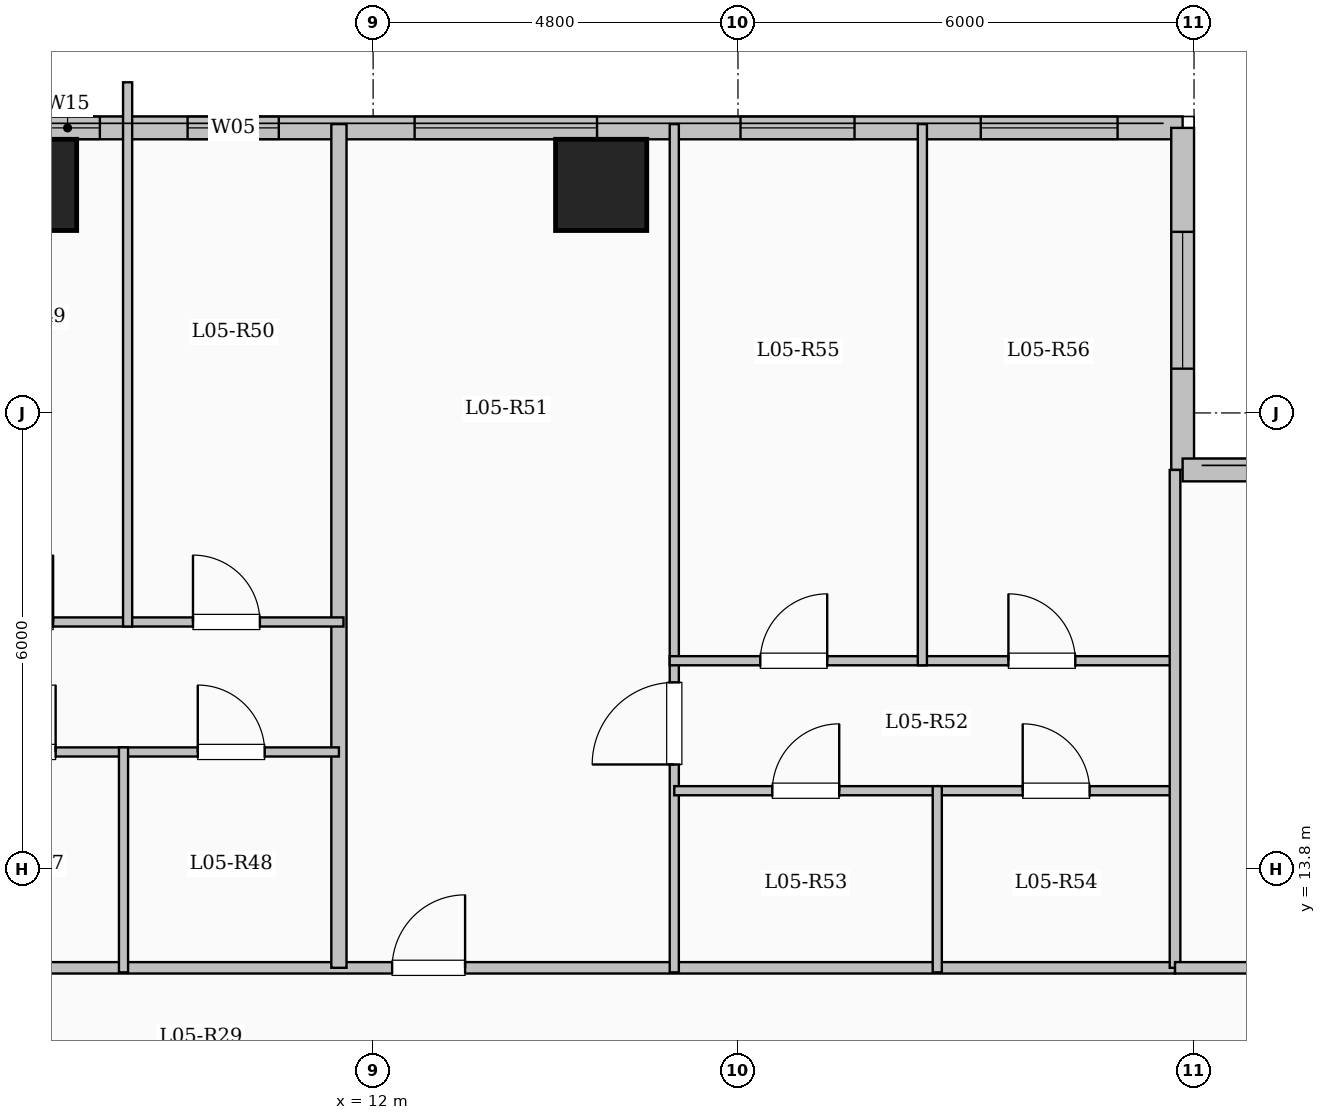
"""IFC4 building model, lengths in metres.
Left out: names, types, materials, properties, quantities, classifications, styles, units other than length and angle.
Written with IfcOpenShell. Run it as: python <this file> out.ifc"""

import sys

from ifc_helpers import new_model, si_unit, direction, frame, frame_2d, origin, origin_2d, place, context, subcontext, project, spatial, rectangle, extrude, element, fill, save


model = new_model("IFC4")
c1 = context("Model", 3, precision=1e-05, world=origin(), true_north=direction((0.0, 1.0)))
c2 = subcontext(c1, "Body", "Model", "MODEL_VIEW")
j1 = project(units=[si_unit("LENGTHUNIT", "METRE"), si_unit("PLANEANGLEUNIT", "RADIAN")], contexts=[c1])
p1 = place(None, origin())
s1 = spatial("IfcSite", under=j1, at=p1, CompositionType="ELEMENT")
p2 = place(p1, origin())
s2 = spatial("IfcBuilding", under=s1, at=p2, CompositionType="ELEMENT")
p3 = place(p2, frame((0.0, 0.0, 24.0)))
s3 = spatial("IfcBuildingStorey", under=s2, at=p3, CompositionType="ELEMENT", Elevation=24.0)
for number, where, z_axis, x_axis in (
    (1, (7.5, 22.8, 0.0), (0.0, 0.0, 1.0), (1.0, 0.0, 0.0)),
    (2, (15.0, 22.8, 0.0), (0.0, 0.0, 1.0), (1.0, 0.0, 0.0)),
):
    element("IfcColumn", number, at=place(p3, frame(where, z_axis=z_axis, x_axis=x_axis)), inside=s3, PredefinedType="COLUMN", context=c2, shape_type="SweptSolid", body=[
        extrude(rectangle(XDim=1.2, YDim=1.2, at=origin_2d()), origin(), (0.0, 0.0, 1.0), 3.35),
    ])
p4 = place(p3, frame((7.35, 23.55, 0.0), z_axis=(0.0, 0.0, 1.0), x_axis=(1.0, 0.0, 0.0)))
e3 = element("IfcWall", 3, at=p4, inside=s3, PredefinedType="SOLIDWALL", context=c2, shape_type="SweptSolid", body=[
    extrude(rectangle(XDim=15.3, YDim=0.3, at=frame_2d((7.65, 0.0))), origin(), (0.0, 0.0, 1.0), 3.1),
])
p5 = place(p4, frame((0.205, 0.0, 0.95)))
e4 = element("IfcOpeningElement", 4, at=p5, cuts=e3, PredefinedType="OPENING", context=c2, shape_type="SweptSolid", body=[
    extrude(rectangle(XDim=0.85, YDim=1.5, at=frame_2d((0.425, 0.75))), frame((0.0, 0.16, 0.0), z_axis=(0.0, -1.0, 0.0), x_axis=(1.0, 0.0, 0.0)), (0.0, 0.0, 1.0), 0.32),
])
p6 = place(p4, frame((2.209, 0.0, 0.95)))
e5 = element("IfcOpeningElement", 5, at=p6, cuts=e3, PredefinedType="OPENING", context=c2, shape_type="SweptSolid", body=[
    extrude(rectangle(XDim=1.2, YDim=1.5, at=frame_2d((0.6, 0.75))), frame((0.0, 0.16, 0.0), z_axis=(0.0, -1.0, 0.0), x_axis=(1.0, 0.0, 0.0)), (0.0, 0.0, 1.0), 0.32),
])
p7 = place(p4, frame((5.196, 0.0, 0.9)))
e6 = element("IfcOpeningElement", 6, at=p7, cuts=e3, PredefinedType="OPENING", context=c2, shape_type="SweptSolid", body=[
    extrude(rectangle(XDim=2.4, YDim=1.8, at=frame_2d((1.2, 0.9))), frame((0.0, 0.16, 0.0), z_axis=(0.0, -1.0, 0.0), x_axis=(1.0, 0.0, 0.0)), (0.0, 0.0, 1.0), 0.32),
])
p8 = place(p4, frame((9.483, 0.0, 0.9)))
e7 = element("IfcOpeningElement", 7, at=p8, cuts=e3, PredefinedType="OPENING", context=c2, shape_type="SweptSolid", body=[
    extrude(rectangle(XDim=1.5, YDim=1.65, at=frame_2d((0.75, 0.825))), frame((0.0, 0.16, 0.0), z_axis=(0.0, -1.0, 0.0), x_axis=(1.0, 0.0, 0.0)), (0.0, 0.0, 1.0), 0.32),
])
p9 = place(p4, frame((12.644, 0.0, 0.9)))
e8 = element("IfcOpeningElement", 8, at=p9, cuts=e3, PredefinedType="OPENING", context=c2, shape_type="SweptSolid", body=[
    extrude(rectangle(XDim=1.8, YDim=1.65, at=frame_2d((0.9, 0.825))), frame((0.0, 0.16, 0.0), z_axis=(0.0, -1.0, 0.0), x_axis=(1.0, 0.0, 0.0)), (0.0, 0.0, 1.0), 0.32),
])
p10 = place(p3, frame((22.65, 23.55, 0.0), z_axis=(0.0, 0.0, 1.0), x_axis=(0.0, -1.0, 0.0)))
e9 = element("IfcWall", 9, at=p10, inside=s3, PredefinedType="SOLIDWALL", context=c2, shape_type="SweptSolid", body=[
    extrude(rectangle(XDim=4.5, YDim=0.3, at=frame_2d((2.25, 0.0))), origin(), (0.0, 0.0, 1.0), 3.1),
])
p11 = place(p10, frame((1.367, 0.0, 0.9)))
e10 = element("IfcOpeningElement", 10, at=p11, cuts=e9, PredefinedType="OPENING", context=c2, shape_type="SweptSolid", body=[
    extrude(rectangle(XDim=1.8, YDim=1.65, at=frame_2d((0.9, 0.825))), frame((0.0, 0.16, 0.0), z_axis=(0.0, -1.0, 0.0), x_axis=(1.0, 0.0, 0.0)), (0.0, 0.0, 1.0), 0.32),
])
p12 = place(p3, frame((22.65, 19.05, 0.0), z_axis=(0.0, 0.0, 1.0), x_axis=(1.0, 0.0, 0.0)))
e11 = element("IfcWall", 11, at=p12, inside=s3, PredefinedType="SOLIDWALL", context=c2, shape_type="SweptSolid", body=[
    extrude(rectangle(XDim=6.0, YDim=0.3, at=frame_2d((3.0, 0.0))), origin(), (0.0, 0.0, 1.0), 3.1),
])
p13 = place(p12, frame((1.975, 0.0, 0.9)))
e12 = element("IfcOpeningElement", 12, at=p13, cuts=e11, PredefinedType="OPENING", context=c2, shape_type="SweptSolid", body=[
    extrude(rectangle(XDim=2.0, YDim=1.7, at=frame_2d((1.0, 0.85))), frame((0.0, 0.16, 0.0), z_axis=(0.0, -1.0, 0.0), x_axis=(1.0, 0.0, 0.0)), (0.0, 0.0, 1.0), 0.32),
])
p14 = place(p3, frame((3.85, 12.5, 0.0), z_axis=(0.0, 0.0, 1.0), x_axis=(1.0, 0.0, 0.0)))
e13 = element("IfcWall", 13, at=p14, inside=s3, PredefinedType="PARTITIONING", context=c2, shape_type="SweptSolid", body=[
    extrude(rectangle(XDim=18.7, YDim=0.15, at=frame_2d((9.35, 0.0))), origin(), (0.0, 0.0, 1.0), 3.1),
])
p15 = place(p14, frame((0.7, 0.0, 0.0)))
e14 = element("IfcOpeningElement", 14, at=p15, cuts=e13, PredefinedType="OPENING", context=c2, shape_type="SweptSolid", body=[
    extrude(rectangle(XDim=0.96, YDim=2.15, at=frame_2d((0.48, 1.075))), frame((0.0, 0.085, 0.0), z_axis=(0.0, -1.0, 0.0), x_axis=(1.0, 0.0, 0.0)), (0.0, 0.0, 1.0), 0.17),
])
p16 = place(p14, frame((8.4, 0.0, 0.0)))
e15 = element("IfcOpeningElement", 15, at=p16, cuts=e13, PredefinedType="OPENING", context=c2, shape_type="SweptSolid", body=[
    extrude(rectangle(XDim=0.96, YDim=2.15, at=frame_2d((0.48, 1.075))), frame((0.0, 0.085, 0.0), z_axis=(0.0, -1.0, 0.0), x_axis=(1.0, 0.0, 0.0)), (0.0, 0.0, 1.0), 0.17),
])
p17 = place(p3, frame((11.55, 12.5, 0.0), z_axis=(0.0, 0.0, 1.0), x_axis=(0.0, 1.0, 0.0)))
e16 = element("IfcWall", 16, at=p17, inside=s3, PredefinedType="SOLIDWALL", context=c2, shape_type="SweptSolid", body=[
    extrude(rectangle(XDim=11.1, YDim=0.2, at=frame_2d((5.55, 0.0))), origin(), (0.0, 0.0, 1.0), 3.1),
])
p18 = place(p3, frame((6.05, 15.34, 0.0), z_axis=(0.0, 0.0, 1.0), x_axis=(1.0, 0.0, 0.0)))
e17 = element("IfcWall", 17, at=p18, inside=s3, PredefinedType="PARTITIONING", context=c2, shape_type="SweptSolid", body=[
    extrude(rectangle(XDim=2.666, YDim=0.12, at=frame_2d((1.333, 0.0))), origin(), (0.0, 0.0, 1.0), 3.1),
])
p19 = place(p18, frame((0.893, 0.0, 0.0)))
e18 = element("IfcOpeningElement", 18, at=p19, cuts=e17, PredefinedType="OPENING", context=c2, shape_type="SweptSolid", body=[
    extrude(rectangle(XDim=0.88, YDim=2.1, at=frame_2d((0.44, 1.05))), frame((0.0, 0.07, 0.0), z_axis=(0.0, -1.0, 0.0), x_axis=(1.0, 0.0, 0.0)), (0.0, 0.0, 1.0), 0.14),
])
p20 = place(p3, frame((8.716, 15.34, 0.0), z_axis=(0.0, 0.0, 1.0), x_axis=(1.0, 0.0, 0.0)))
e19 = element("IfcWall", 19, at=p20, inside=s3, PredefinedType="PARTITIONING", context=c2, shape_type="SweptSolid", body=[
    extrude(rectangle(XDim=2.834, YDim=0.12, at=frame_2d((1.417, 0.0))), origin(), (0.0, 0.0, 1.0), 3.1),
])
p21 = place(p20, frame((0.977, 0.0, 0.0)))
e20 = element("IfcOpeningElement", 20, at=p21, cuts=e19, PredefinedType="OPENING", context=c2, shape_type="SweptSolid", body=[
    extrude(rectangle(XDim=0.88, YDim=2.1, at=frame_2d((0.44, 1.05))), frame((0.0, 0.07, 0.0), z_axis=(0.0, -1.0, 0.0), x_axis=(1.0, 0.0, 0.0)), (0.0, 0.0, 1.0), 0.14),
])
p22 = place(p3, frame((5.99, 17.05, 0.0), z_axis=(0.0, 0.0, 1.0), x_axis=(1.0, 0.0, 0.0)))
e21 = element("IfcWall", 21, at=p22, inside=s3, PredefinedType="PARTITIONING", context=c2, shape_type="SweptSolid", body=[
    extrude(rectangle(XDim=5.62, YDim=0.12, at=frame_2d((2.81, 0.0))), origin(), (0.0, 0.0, 1.0), 3.1),
])
p23 = place(p22, frame((0.92, 0.0, 0.0)))
e22 = element("IfcOpeningElement", 22, at=p23, cuts=e21, PredefinedType="OPENING", context=c2, shape_type="SweptSolid", body=[
    extrude(rectangle(XDim=0.88, YDim=2.1, at=frame_2d((0.44, 1.05))), frame((0.0, 0.07, 0.0), z_axis=(0.0, -1.0, 0.0), x_axis=(1.0, 0.0, 0.0)), (0.0, 0.0, 1.0), 0.14),
])
p24 = place(p22, frame((3.64, 0.0, 0.0)))
e23 = element("IfcOpeningElement", 23, at=p24, cuts=e21, PredefinedType="OPENING", context=c2, shape_type="SweptSolid", body=[
    extrude(rectangle(XDim=0.88, YDim=2.1, at=frame_2d((0.44, 1.05))), frame((0.0, 0.07, 0.0), z_axis=(0.0, -1.0, 0.0), x_axis=(1.0, 0.0, 0.0)), (0.0, 0.0, 1.0), 0.14),
])
p25 = place(p3, frame((8.716, 12.44, 0.0), z_axis=(0.0, 0.0, 1.0), x_axis=(0.0, 1.0, 0.0)))
e24 = element("IfcWall", 24, at=p25, inside=s3, PredefinedType="PARTITIONING", context=c2, shape_type="SweptSolid", body=[
    extrude(rectangle(XDim=2.96, YDim=0.12, at=frame_2d((1.48, 0.0))), origin(), (0.0, 0.0, 1.0), 3.1),
])
p26 = place(p3, frame((8.77, 16.99, 0.0), z_axis=(0.0, 0.0, 1.0), x_axis=(0.0, 1.0, 0.0)))
e25 = element("IfcWall", 25, at=p26, inside=s3, PredefinedType="PARTITIONING", context=c2, shape_type="SweptSolid", body=[
    extrude(rectangle(XDim=7.16, YDim=0.12, at=frame_2d((3.58, 0.0))), origin(), (0.0, 0.0, 1.0), 3.1),
])
p27 = place(p3, frame((15.962, 12.44, 0.0), z_axis=(0.0, 0.0, 1.0), x_axis=(0.0, 1.0, 0.0)))
e26 = element("IfcWall", 26, at=p27, inside=s3, PredefinedType="PARTITIONING", context=c2, shape_type="SweptSolid", body=[
    extrude(rectangle(XDim=11.16, YDim=0.12, at=frame_2d((5.58, 0.0))), origin(), (0.0, 0.0, 1.0), 3.1),
])
p28 = place(p27, frame((2.735, 0.0, 0.0)))
e27 = element("IfcOpeningElement", 27, at=p28, cuts=e26, PredefinedType="OPENING", context=c2, shape_type="SweptSolid", body=[
    extrude(rectangle(XDim=1.08, YDim=2.15, at=frame_2d((0.54, 1.075))), frame((0.0, 0.07, 0.0), z_axis=(0.0, -1.0, 0.0), x_axis=(1.0, 0.0, 0.0)), (0.0, 0.0, 1.0), 0.14),
])
p29 = place(p3, frame((15.962, 14.83, 0.0), z_axis=(0.0, 0.0, 1.0), x_axis=(1.0, 0.0, 0.0)))
e28 = element("IfcWall", 28, at=p29, inside=s3, PredefinedType="PARTITIONING", context=c2, shape_type="SweptSolid", body=[
    extrude(rectangle(XDim=3.46, YDim=0.12, at=frame_2d((1.73, 0.0))), origin(), (0.0, 0.0, 1.0), 3.1),
])
p30 = place(p29, frame((1.29, 0.0, 0.0)))
e29 = element("IfcOpeningElement", 29, at=p30, cuts=e28, PredefinedType="OPENING", context=c2, shape_type="SweptSolid", body=[
    extrude(rectangle(XDim=0.88, YDim=2.1, at=frame_2d((0.44, 1.05))), frame((0.0, 0.07, 0.0), z_axis=(0.0, -1.0, 0.0), x_axis=(1.0, 0.0, 0.0)), (0.0, 0.0, 1.0), 0.14),
])
p31 = place(p3, frame((19.422, 14.83, 0.0), z_axis=(0.0, 0.0, 1.0), x_axis=(1.0, 0.0, 0.0)))
e30 = element("IfcWall", 30, at=p31, inside=s3, PredefinedType="PARTITIONING", context=c2, shape_type="SweptSolid", body=[
    extrude(rectangle(XDim=3.128, YDim=0.12, at=frame_2d((1.564, 0.0))), origin(), (0.0, 0.0, 1.0), 3.1),
])
p32 = place(p31, frame((1.124, 0.0, 0.0)))
e31 = element("IfcOpeningElement", 31, at=p32, cuts=e30, PredefinedType="OPENING", context=c2, shape_type="SweptSolid", body=[
    extrude(rectangle(XDim=0.88, YDim=2.1, at=frame_2d((0.44, 1.05))), frame((0.0, 0.07, 0.0), z_axis=(0.0, -1.0, 0.0), x_axis=(1.0, 0.0, 0.0)), (0.0, 0.0, 1.0), 0.14),
])
p33 = place(p3, frame((15.902, 16.54, 0.0), z_axis=(0.0, 0.0, 1.0), x_axis=(1.0, 0.0, 0.0)))
e32 = element("IfcWall", 32, at=p33, inside=s3, PredefinedType="PARTITIONING", context=c2, shape_type="SweptSolid", body=[
    extrude(rectangle(XDim=6.708, YDim=0.12, at=frame_2d((3.354, 0.0))), origin(), (0.0, 0.0, 1.0), 3.1),
])
p34 = place(p33, frame((1.192, 0.0, 0.0)))
e33 = element("IfcOpeningElement", 33, at=p34, cuts=e32, PredefinedType="OPENING", context=c2, shape_type="SweptSolid", body=[
    extrude(rectangle(XDim=0.88, YDim=2.1, at=frame_2d((0.44, 1.05))), frame((0.0, 0.07, 0.0), z_axis=(0.0, -1.0, 0.0), x_axis=(1.0, 0.0, 0.0)), (0.0, 0.0, 1.0), 0.14),
])
p35 = place(p33, frame((4.456, 0.0, 0.0)))
e34 = element("IfcOpeningElement", 34, at=p35, cuts=e32, PredefinedType="OPENING", context=c2, shape_type="SweptSolid", body=[
    extrude(rectangle(XDim=0.88, YDim=2.1, at=frame_2d((0.44, 1.05))), frame((0.0, 0.07, 0.0), z_axis=(0.0, -1.0, 0.0), x_axis=(1.0, 0.0, 0.0)), (0.0, 0.0, 1.0), 0.14),
])
p36 = place(p3, frame((19.422, 12.44, 0.0), z_axis=(0.0, 0.0, 1.0), x_axis=(0.0, 1.0, 0.0)))
e35 = element("IfcWall", 35, at=p36, inside=s3, PredefinedType="PARTITIONING", context=c2, shape_type="SweptSolid", body=[
    extrude(rectangle(XDim=2.45, YDim=0.12, at=frame_2d((1.225, 0.0))), origin(), (0.0, 0.0, 1.0), 3.1),
])
p37 = place(p3, frame((19.226, 16.48, 0.0), z_axis=(0.0, 0.0, 1.0), x_axis=(0.0, 1.0, 0.0)))
e36 = element("IfcWall", 36, at=p37, inside=s3, PredefinedType="PARTITIONING", context=c2, shape_type="SweptSolid", body=[
    extrude(rectangle(XDim=7.12, YDim=0.12, at=frame_2d((3.56, 0.0))), origin(), (0.0, 0.0, 1.0), 3.1),
])
p38 = place(p3, frame((22.55, 12.5, 0.0), z_axis=(0.0, 0.0, 1.0), x_axis=(0.0, 1.0, 0.0)))
e37 = element("IfcWall", 37, at=p38, inside=s3, PredefinedType="PARTITIONING", context=c2, shape_type="SweptSolid", body=[
    extrude(rectangle(XDim=6.55, YDim=0.14, at=frame_2d((3.275, 0.0))), origin(), (0.0, 0.0, 1.0), 3.1),
])
p39 = place(p3, frame((22.55, 12.5, 0.0), z_axis=(0.0, 0.0, 1.0), x_axis=(1.0, 0.0, 0.0)))
e38 = element("IfcWall", 38, at=p39, inside=s3, PredefinedType="PARTITIONING", context=c2, shape_type="SweptSolid", body=[
    extrude(rectangle(XDim=6.13, YDim=0.15, at=frame_2d((3.065, 0.0))), origin(), (0.0, 0.0, 1.0), 3.1),
])
p40 = place(p39, frame((2.59, 0.0, 0.0)))
e39 = element("IfcOpeningElement", 39, at=p40, cuts=e38, PredefinedType="OPENING", context=c2, shape_type="SweptSolid", body=[
    extrude(rectangle(XDim=0.95, YDim=2.15, at=frame_2d((0.475, 1.075))), frame((0.0, 0.085, 0.0), z_axis=(0.0, -1.0, 0.0), x_axis=(1.0, 0.0, 0.0)), (0.0, 0.0, 1.0), 0.17),
])
p41 = place(p5, origin())
e40 = element("IfcWindow", 40, at=p41, inside=s3, PartitioningType="SINGLE_PANEL", PredefinedType="WINDOW", context=c2, shape_type="SweptSolid", body=[
    extrude(rectangle(XDim=0.85, YDim=1.5, at=frame_2d((0.425, 0.75))), frame((0.0, 0.03, 0.0), z_axis=(0.0, -1.0, 0.0), x_axis=(1.0, 0.0, 0.0)), (0.0, 0.0, 1.0), 0.06),
])
fill(e4, e40)
p42 = place(p6, origin())
e41 = element("IfcWindow", 41, at=p42, inside=s3, PartitioningType="SINGLE_PANEL", PredefinedType="WINDOW", context=c2, shape_type="SweptSolid", body=[
    extrude(rectangle(XDim=1.2, YDim=1.5, at=frame_2d((0.6, 0.75))), frame((0.0, 0.03, 0.0), z_axis=(0.0, -1.0, 0.0), x_axis=(1.0, 0.0, 0.0)), (0.0, 0.0, 1.0), 0.06),
])
fill(e5, e41)
p43 = place(p7, origin())
e42 = element("IfcWindow", 42, at=p43, inside=s3, PartitioningType="SINGLE_PANEL", PredefinedType="WINDOW", context=c2, shape_type="SweptSolid", body=[
    extrude(rectangle(XDim=2.4, YDim=1.8, at=frame_2d((1.2, 0.9))), frame((0.0, 0.03, 0.0), z_axis=(0.0, -1.0, 0.0), x_axis=(1.0, 0.0, 0.0)), (0.0, 0.0, 1.0), 0.06),
])
fill(e6, e42)
p44 = place(p8, origin())
e43 = element("IfcWindow", 43, at=p44, inside=s3, PartitioningType="SINGLE_PANEL", PredefinedType="WINDOW", context=c2, shape_type="SweptSolid", body=[
    extrude(rectangle(XDim=1.5, YDim=1.65, at=frame_2d((0.75, 0.825))), frame((0.0, 0.03, 0.0), z_axis=(0.0, -1.0, 0.0), x_axis=(1.0, 0.0, 0.0)), (0.0, 0.0, 1.0), 0.06),
])
fill(e7, e43)
p45 = place(p9, origin())
e44 = element("IfcWindow", 44, at=p45, inside=s3, PartitioningType="SINGLE_PANEL", PredefinedType="WINDOW", context=c2, shape_type="SweptSolid", body=[
    extrude(rectangle(XDim=1.8, YDim=1.65, at=frame_2d((0.9, 0.825))), frame((0.0, 0.03, 0.0), z_axis=(0.0, -1.0, 0.0), x_axis=(1.0, 0.0, 0.0)), (0.0, 0.0, 1.0), 0.06),
])
fill(e8, e44)
p46 = place(p11, origin())
e45 = element("IfcWindow", 45, at=p46, inside=s3, PartitioningType="SINGLE_PANEL", PredefinedType="WINDOW", context=c2, shape_type="SweptSolid", body=[
    extrude(rectangle(XDim=1.8, YDim=1.65, at=frame_2d((0.9, 0.825))), frame((0.0, 0.03, 0.0), z_axis=(0.0, -1.0, 0.0), x_axis=(1.0, 0.0, 0.0)), (0.0, 0.0, 1.0), 0.06),
])
fill(e10, e45)
p47 = place(p19, origin())
e46 = element("IfcDoor", 46, at=p47, inside=s3, OperationType="SINGLE_SWING_RIGHT", PredefinedType="DOOR", context=c2, shape_type="SweptSolid", body=[
    extrude(rectangle(XDim=0.88, YDim=2.1, at=frame_2d((0.44, 1.05))), frame((0.0, 0.025, 0.0), z_axis=(0.0, -1.0, 0.0), x_axis=(1.0, 0.0, 0.0)), (0.0, 0.0, 1.0), 0.05),
])
fill(e18, e46)
p48 = place(p21, origin())
e47 = element("IfcDoor", 47, at=p48, inside=s3, OperationType="SINGLE_SWING_LEFT", PredefinedType="DOOR", context=c2, shape_type="SweptSolid", body=[
    extrude(rectangle(XDim=0.88, YDim=2.1, at=frame_2d((0.44, 1.05))), frame((0.0, 0.025, 0.0), z_axis=(0.0, -1.0, 0.0), x_axis=(1.0, 0.0, 0.0)), (0.0, 0.0, 1.0), 0.05),
])
fill(e20, e47)
p49 = place(p23, origin())
e48 = element("IfcDoor", 48, at=p49, inside=s3, OperationType="SINGLE_SWING_RIGHT", PredefinedType="DOOR", context=c2, shape_type="SweptSolid", body=[
    extrude(rectangle(XDim=0.88, YDim=2.1, at=frame_2d((0.44, 1.05))), frame((0.0, 0.025, 0.0), z_axis=(0.0, -1.0, 0.0), x_axis=(1.0, 0.0, 0.0)), (0.0, 0.0, 1.0), 0.05),
])
fill(e22, e48)
p50 = place(p24, origin())
e49 = element("IfcDoor", 49, at=p50, inside=s3, OperationType="SINGLE_SWING_LEFT", PredefinedType="DOOR", context=c2, shape_type="SweptSolid", body=[
    extrude(rectangle(XDim=0.88, YDim=2.1, at=frame_2d((0.44, 1.05))), frame((0.0, 0.025, 0.0), z_axis=(0.0, -1.0, 0.0), x_axis=(1.0, 0.0, 0.0)), (0.0, 0.0, 1.0), 0.05),
])
fill(e23, e49)
p51 = place(p16, origin())
e50 = element("IfcDoor", 50, at=p51, inside=s3, OperationType="SINGLE_SWING_RIGHT", PredefinedType="DOOR", context=c2, shape_type="SweptSolid", body=[
    extrude(rectangle(XDim=0.96, YDim=2.15, at=frame_2d((0.48, 1.075))), frame((0.0, 0.025, 0.0), z_axis=(0.0, -1.0, 0.0), x_axis=(1.0, 0.0, 0.0)), (0.0, 0.0, 1.0), 0.05),
])
fill(e15, e50)
p52 = place(p28, origin())
e51 = element("IfcDoor", 51, at=p52, inside=s3, OperationType="SINGLE_SWING_LEFT", PredefinedType="DOOR", context=c2, shape_type="SweptSolid", body=[
    extrude(rectangle(XDim=1.08, YDim=2.15, at=frame_2d((0.54, 1.075))), frame((0.0, 0.025, 0.0), z_axis=(0.0, -1.0, 0.0), x_axis=(1.0, 0.0, 0.0)), (0.0, 0.0, 1.0), 0.05),
])
fill(e27, e51)
p53 = place(p30, origin())
e52 = element("IfcDoor", 52, at=p53, inside=s3, OperationType="SINGLE_SWING_RIGHT", PredefinedType="DOOR", context=c2, shape_type="SweptSolid", body=[
    extrude(rectangle(XDim=0.88, YDim=2.1, at=frame_2d((0.44, 1.05))), frame((0.0, 0.025, 0.0), z_axis=(0.0, -1.0, 0.0), x_axis=(1.0, 0.0, 0.0)), (0.0, 0.0, 1.0), 0.05),
])
fill(e29, e52)
p54 = place(p32, origin())
e53 = element("IfcDoor", 53, at=p54, inside=s3, OperationType="SINGLE_SWING_LEFT", PredefinedType="DOOR", context=c2, shape_type="SweptSolid", body=[
    extrude(rectangle(XDim=0.88, YDim=2.1, at=frame_2d((0.44, 1.05))), frame((0.0, 0.025, 0.0), z_axis=(0.0, -1.0, 0.0), x_axis=(1.0, 0.0, 0.0)), (0.0, 0.0, 1.0), 0.05),
])
fill(e31, e53)
p55 = place(p34, origin())
e54 = element("IfcDoor", 54, at=p55, inside=s3, OperationType="SINGLE_SWING_RIGHT", PredefinedType="DOOR", context=c2, shape_type="SweptSolid", body=[
    extrude(rectangle(XDim=0.88, YDim=2.1, at=frame_2d((0.44, 1.05))), frame((0.0, 0.025, 0.0), z_axis=(0.0, -1.0, 0.0), x_axis=(1.0, 0.0, 0.0)), (0.0, 0.0, 1.0), 0.05),
])
fill(e33, e54)
p56 = place(p35, origin())
e55 = element("IfcDoor", 55, at=p56, inside=s3, OperationType="SINGLE_SWING_LEFT", PredefinedType="DOOR", context=c2, shape_type="SweptSolid", body=[
    extrude(rectangle(XDim=0.88, YDim=2.1, at=frame_2d((0.44, 1.05))), frame((0.0, 0.025, 0.0), z_axis=(0.0, -1.0, 0.0), x_axis=(1.0, 0.0, 0.0)), (0.0, 0.0, 1.0), 0.05),
])
fill(e34, e55)
save(model, sys.argv[1])
